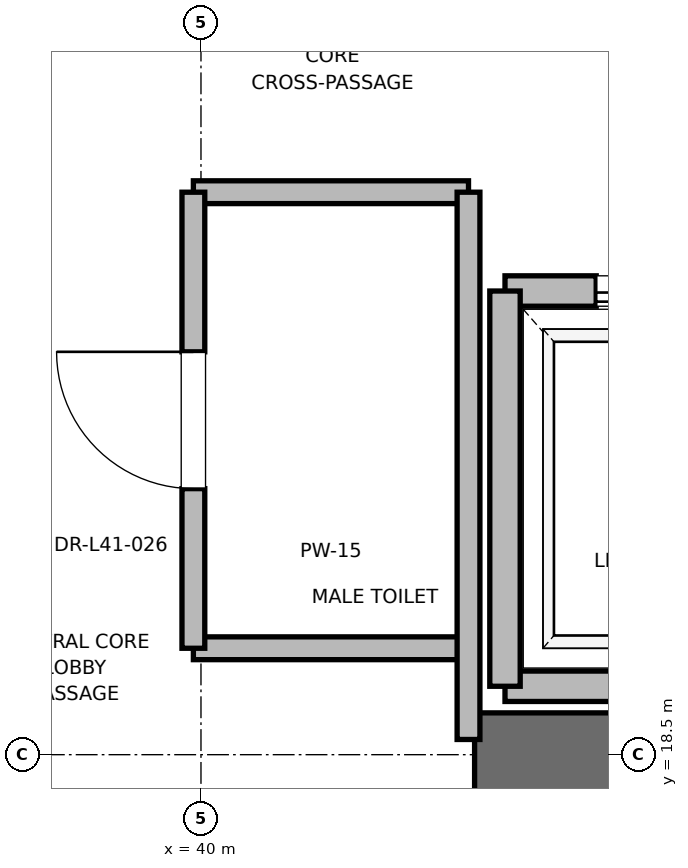
"""IFC4 building model, lengths in metres.
Left out: names, types, materials, properties, quantities, classifications, styles, units other than length and angle.
Written with IfcOpenShell. Run it as: python <this file> out.ifc"""

import sys

from ifc_helpers import new_model, si_unit, direction, frame, frame_2d, origin, place, context, subcontext, project, spatial, rectangle, extrude, element, fill, save


model = new_model("IFC4")
c1 = context("Model", 3, precision=1e-05, world=origin(), true_north=direction((0.0, 1.0)))
c2 = subcontext(c1, "Body", "Model", "MODEL_VIEW")
j1 = project(units=[si_unit("LENGTHUNIT", "METRE"), si_unit("PLANEANGLEUNIT", "RADIAN")], contexts=[c1])
p1 = place(None, origin())
s1 = spatial("IfcSite", under=j1, at=p1, CompositionType="ELEMENT")
p2 = place(p1, origin())
s2 = spatial("IfcBuilding", under=s1, at=p2, CompositionType="ELEMENT")
p3 = place(p2, frame((0.0, 0.0, 176.4)))
s3 = spatial("IfcBuildingStorey", under=s2, at=p3, CompositionType="ELEMENT", Elevation=176.4)
p4 = place(p3, frame((41.8, 18.5, 0.0), z_axis=(0.0, 0.0, 1.0), x_axis=(1.0, 0.0, 0.0)))
e1 = element("IfcWall", 1, at=p4, inside=s3, PredefinedType="SHEAR", context=c2, shape_type="SweptSolid", body=[
    extrude(rectangle(XDim=9.2, YDim=0.55, at=frame_2d((4.6, 0.0))), origin(), (0.0, 0.0, 1.0), 3.775),
])
p5 = place(p3, frame((42.0, 18.95, 0.0), z_axis=(0.0, 0.0, 1.0), x_axis=(1.0, 0.0, 0.0)))
e2 = element("IfcWall", 2, at=p5, inside=s3, PredefinedType="SOLIDWALL", context=c2, shape_type="SweptSolid", body=[
    extrude(rectangle(XDim=2.3, YDim=0.2, at=frame_2d((1.15, 0.0))), origin(), (0.0, 0.0, 1.0), 2.755),
])
p6 = place(p3, frame((44.3, 21.55, 0.0), z_axis=(0.0, 0.0, 1.0), x_axis=(-1.0, 0.0, 0.0)))
e3 = element("IfcWall", 3, at=p6, inside=s3, PredefinedType="SOLIDWALL", context=c2, shape_type="SweptSolid", body=[
    extrude(rectangle(XDim=2.3, YDim=0.2, at=frame_2d((1.15, 0.0))), origin(), (0.0, 0.0, 1.0), 3.775),
])
p7 = place(p6, frame((0.6, 0.0, 0.0)))
e4 = element("IfcOpeningElement", 4, at=p7, cuts=e3, PredefinedType="OPENING", context=c2, shape_type="SweptSolid", body=[
    extrude(rectangle(XDim=1.1, YDim=2.2, at=frame_2d((0.55, 1.1))), frame((0.0, 0.1, 0.0), z_axis=(0.0, -1.0, 0.0), x_axis=(1.0, 0.0, 0.0)), (0.0, 0.0, 1.0), 0.2),
])
p8 = place(p3, frame((42.0, 21.55, 0.0), z_axis=(0.0, 0.0, 1.0), x_axis=(0.0, -1.0, 0.0)))
e5 = element("IfcWall", 5, at=p8, inside=s3, PredefinedType="SOLIDWALL", context=c2, shape_type="SweptSolid", body=[
    extrude(rectangle(XDim=2.6, YDim=0.2, at=frame_2d((1.3, 0.0))), origin(), (0.0, 0.0, 1.0), 2.755),
])
for number, where, z_axis, x_axis in (
    (6, (39.95, 19.2, 0.0), (0.0, 0.0, 1.0), (1.0, 0.0, 0.0)),
    (7, (39.95, 22.2, 0.0), (0.0, 0.0, 1.0), (1.0, 0.0, 0.0)),
):
    element("IfcWall", number, at=place(p3, frame(where, z_axis=z_axis, x_axis=x_axis)), inside=s3, PredefinedType="PARTITIONING", context=c2, shape_type="SweptSolid", body=[
        extrude(rectangle(XDim=1.81, YDim=0.15, at=frame_2d((0.905, 0.0))), origin(), (0.0, 0.0, 1.0), 2.85),
    ])
p9 = place(p3, frame((41.76, 18.6, 0.0), z_axis=(0.0, 0.0, 1.0), x_axis=(0.0, 1.0, 0.0)))
e8 = element("IfcWall", 8, at=p9, inside=s3, PredefinedType="PARTITIONING", context=c2, shape_type="SweptSolid", body=[
    extrude(rectangle(XDim=3.6, YDim=0.15, at=frame_2d((1.8, 0.0))), origin(), (0.0, 0.0, 1.0), 2.755),
])
p10 = place(p3, frame((39.95, 19.2, 0.0), z_axis=(0.0, 0.0, 1.0), x_axis=(0.0, 1.0, 0.0)))
e9 = element("IfcWall", 9, at=p10, inside=s3, PredefinedType="PARTITIONING", context=c2, shape_type="SweptSolid", body=[
    extrude(rectangle(XDim=3.0, YDim=0.15, at=frame_2d((1.5, 0.0))), origin(), (0.0, 0.0, 1.0), 2.85),
])
p11 = place(p10, frame((1.05, 0.0, 0.0)))
e10 = element("IfcOpeningElement", 10, at=p11, cuts=e9, PredefinedType="OPENING", context=c2, shape_type="SweptSolid", body=[
    extrude(rectangle(XDim=0.9, YDim=2.1, at=frame_2d((0.45, 1.05))), frame((0.0, 0.075, 0.0), z_axis=(0.0, -1.0, 0.0), x_axis=(1.0, 0.0, 0.0)), (0.0, 0.0, 1.0), 0.15),
])
p12 = place(p7, origin())
e11 = element("IfcDoor", 11, at=p12, inside=s3, OperationType="SLIDING_TO_RIGHT", PredefinedType="DOOR", context=c2, shape_type="SweptSolid", body=[
    extrude(rectangle(XDim=1.1, YDim=2.2, at=frame_2d((0.55, 1.1))), frame((0.0, 0.025, 0.0), z_axis=(0.0, -1.0, 0.0), x_axis=(1.0, 0.0, 0.0)), (0.0, 0.0, 1.0), 0.05),
])
fill(e4, e11)
p13 = place(p11, origin())
e12 = element("IfcDoor", 12, at=p13, inside=s3, OperationType="SINGLE_SWING_RIGHT", PredefinedType="DOOR", context=c2, shape_type="SweptSolid", body=[
    extrude(rectangle(XDim=0.9, YDim=2.1, at=frame_2d((0.45, 1.05))), frame((0.0, 0.025, 0.0), z_axis=(0.0, -1.0, 0.0), x_axis=(1.0, 0.0, 0.0)), (0.0, 0.0, 1.0), 0.05),
])
fill(e10, e12)
save(model, sys.argv[1])
